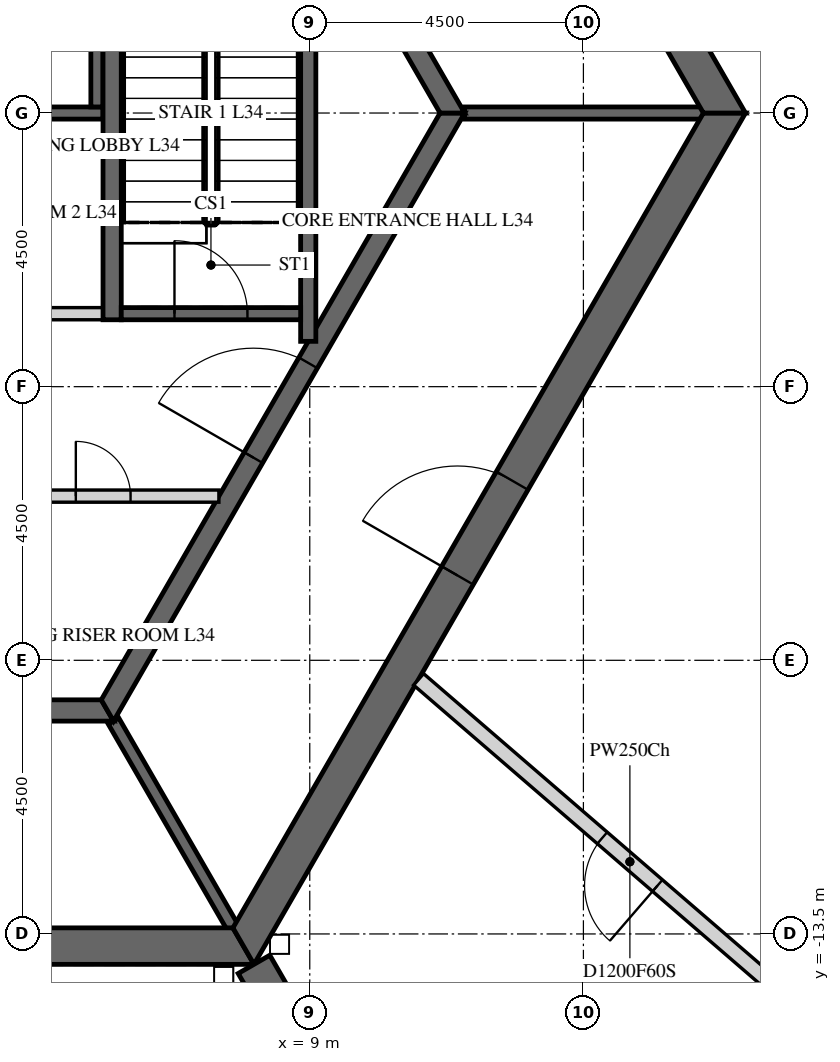
"""IFC4 building model, lengths in metres.
Left out: names, types, materials, properties, quantities, classifications, styles, units other than length and angle.
Written with IfcOpenShell. Run it as: python <this file> out.ifc"""

import sys

from ifc_helpers import new_model, si_unit, direction, frame, frame_2d, origin, place, context, subcontext, project, spatial, polyline, rectangle, outline, extrude, element, fill, save


model = new_model("IFC4")
c1 = context("Model", 3, precision=1e-05, world=origin(), true_north=direction((0.0, 1.0)))
c2 = subcontext(c1, "Body", "Model", "MODEL_VIEW")
j1 = project(units=[si_unit("LENGTHUNIT", "METRE"), si_unit("PLANEANGLEUNIT", "RADIAN")], contexts=[c1])
p1 = place(None, origin())
s1 = spatial("IfcSite", under=j1, at=p1, CompositionType="ELEMENT")
p2 = place(p1, origin())
s2 = spatial("IfcBuilding", under=s1, at=p2, CompositionType="ELEMENT")
p3 = place(p2, frame((0.0, 0.0, 146.7)))
s3 = spatial("IfcBuildingStorey", under=s2, at=p3, CompositionType="ELEMENT", Elevation=146.7)
p4 = place(p3, frame((-7.91, -13.7, -0.3), z_axis=(0.0, 0.0, 1.0), x_axis=(1.0, 0.0, 0.0)))
e1 = element("IfcWall", 1, at=p4, inside=s3, PredefinedType="SHEAR", context=c2, shape_type="SweptSolid", body=[
    extrude(outline(polyline([(-0.173, -0.3), (15.993, -0.3), (15.646, 0.3), (0.173, 0.3), (-0.173, -0.3)])), origin(), (0.0, 0.0, 1.0), 5.8),
])
p5 = place(p4, frame((7.31, 0.0, 0.3)))
e2 = element("IfcOpeningElement", 2, at=p5, cuts=e1, PredefinedType="OPENING", context=c2, shape_type="SweptSolid", body=[
    extrude(rectangle(XDim=1.2, YDim=2.4, at=frame_2d((0.6, 1.2))), frame((0.0, 0.31, 0.0), z_axis=(0.0, -1.0, 0.0), x_axis=(1.0, 0.0, 0.0)), (0.0, 0.0, 1.0), 0.62),
])
p6 = place(p3, frame((7.91, -13.7, -0.3), z_axis=(0.0, 0.0, 1.0), x_axis=(0.499999880136, 0.866025472988, 0.0)))
e3 = element("IfcWall", 3, at=p6, inside=s3, PredefinedType="SHEAR", context=c2, shape_type="SweptSolid", body=[
    extrude(outline(polyline([(-0.173, -0.3), (15.993, -0.3), (15.646, 0.3), (0.173, 0.3), (-0.173, -0.3)])), origin(), (0.0, 0.0, 1.0), 5.8),
])
p7 = place(p6, frame((7.039, 0.0, 0.3)))
e4 = element("IfcOpeningElement", 4, at=p7, cuts=e3, PredefinedType="OPENING", context=c2, shape_type="SweptSolid", body=[
    extrude(rectangle(XDim=1.8, YDim=2.4, at=frame_2d((0.9, 1.2))), frame((0.0, 0.31, 0.0), z_axis=(0.0, -1.0, 0.0), x_axis=(1.0, 0.0, 0.0)), (0.0, 0.0, 1.0), 0.62),
])
p8 = place(p3, frame((15.819, 0.0, -0.3), z_axis=(0.0, 0.0, 1.0), x_axis=(-0.499999880136, 0.866025472988, 0.0)))
e5 = element("IfcWall", 5, at=p8, inside=s3, PredefinedType="SHEAR", context=c2, shape_type="SweptSolid", body=[
    extrude(outline(polyline([(-0.173, -0.3), (15.993, -0.3), (15.646, 0.3), (0.173, 0.3), (-0.173, -0.3)])), origin(), (0.0, 0.0, 1.0), 5.8),
])
p9 = place(p8, frame((6.981, 0.0, 0.3)))
e6 = element("IfcOpeningElement", 6, at=p9, cuts=e5, PredefinedType="OPENING", context=c2, shape_type="SweptSolid", body=[
    extrude(rectangle(XDim=1.8, YDim=2.4, at=frame_2d((0.9, 1.2))), frame((0.0, 0.31, 0.0), z_axis=(0.0, -1.0, 0.0), x_axis=(1.0, 0.0, 0.0)), (0.0, 0.0, 1.0), 0.62),
])
p10 = place(p3, frame((8.083, -14.0, -0.3), z_axis=(0.0, 0.0, 1.0), x_axis=(0.499997680643, -0.866026742862, 0.0)))
e7 = element("IfcWall", 7, at=p10, inside=s3, PredefinedType="SHEAR", context=c2, shape_type="SweptSolid", body=[
    extrude(rectangle(XDim=16.509, YDim=0.6, at=frame_2d((8.254, 0.0))), origin(), (0.0, 0.0, 1.0), 5.8),
])
p11 = place(p10, frame((7.354, 0.0, 0.3)))
e8 = element("IfcOpeningElement", 8, at=p11, cuts=e7, PredefinedType="OPENING", context=c2, shape_type="SweptSolid", body=[
    extrude(rectangle(XDim=1.8, YDim=2.4, at=frame_2d((0.9, 1.2))), frame((0.0, 0.31, 0.0), z_axis=(0.0, -1.0, 0.0), x_axis=(1.0, 0.0, 0.0)), (0.0, 0.0, 1.0), 0.62),
])
p12 = place(p3, frame((-5.673, -9.825, -0.3), z_axis=(0.0, 0.0, 1.0), x_axis=(1.0, 0.0, 0.0)))
e9 = element("IfcWall", 9, at=p12, inside=s3, PredefinedType="SHEAR", context=c2, shape_type="SweptSolid", body=[
    extrude(outline(polyline([(-0.101, -0.175), (11.446, -0.175), (11.244, 0.175), (0.101, 0.175), (-0.101, -0.175)])), origin(), (0.0, 0.0, 1.0), 5.8),
])
p13 = place(p3, frame((5.673, -9.825, -0.3), z_axis=(0.0, 0.0, 1.0), x_axis=(0.499995046907, 0.866028263435, 0.0)))
e10 = element("IfcWall", 10, at=p13, inside=s3, PredefinedType="SHEAR", context=c2, shape_type="SweptSolid", body=[
    extrude(outline(polyline([(-0.101, -0.175), (11.446, -0.175), (11.244, 0.175), (0.101, 0.175), (-0.101, -0.175)])), origin(), (0.0, 0.0, 1.0), 5.8),
])
p14 = place(p13, frame((4.801, 0.0, 0.3)))
e11 = element("IfcOpeningElement", 11, at=p14, cuts=e10, PredefinedType="OPENING", context=c2, shape_type="SweptSolid", body=[
    extrude(rectangle(XDim=1.8, YDim=2.4, at=frame_2d((0.9, 1.2))), frame((0.0, 0.185, 0.0), z_axis=(0.0, -1.0, 0.0), x_axis=(1.0, 0.0, 0.0)), (0.0, 0.0, 1.0), 0.37),
])
p15 = place(p3, frame((11.345, 0.0, -0.3), z_axis=(0.0, 0.0, 1.0), x_axis=(-0.499995046907, 0.866028263435, 0.0)))
e12 = element("IfcWall", 12, at=p15, inside=s3, PredefinedType="SHEAR", context=c2, shape_type="SweptSolid", body=[
    extrude(outline(polyline([(-0.101, -0.175), (11.446, -0.175), (11.244, 0.175), (0.101, 0.175), (-0.101, -0.175)])), origin(), (0.0, 0.0, 1.0), 5.8),
])
p16 = place(p15, frame((4.744, 0.0, 0.3)))
e13 = element("IfcOpeningElement", 13, at=p16, cuts=e12, PredefinedType="OPENING", context=c2, shape_type="SweptSolid", body=[
    extrude(rectangle(XDim=1.8, YDim=2.4, at=frame_2d((0.9, 1.2))), frame((0.0, 0.185, 0.0), z_axis=(0.0, -1.0, 0.0), x_axis=(1.0, 0.0, 0.0)), (0.0, 0.0, 1.0), 0.37),
])
p17 = place(p3, frame((-5.6, 0.0, -0.25), z_axis=(0.0, 0.0, 1.0), x_axis=(1.0, 0.0, 0.0)))
e14 = element("IfcWall", 14, at=p17, inside=s3, PredefinedType="SHEAR", context=c2, shape_type="SweptSolid", body=[
    extrude(rectangle(XDim=11.2, YDim=0.2, at=frame_2d((5.6, 0.0))), origin(), (0.0, 0.0, 1.0), 5.75),
])
p18 = place(p3, frame((5.5, 0.1, -0.25), z_axis=(0.0, 0.0, 1.0), x_axis=(0.0, 1.0, 0.0)))
e15 = element("IfcWall", 15, at=p18, inside=s3, PredefinedType="SHEAR", context=c2, shape_type="SweptSolid", body=[
    extrude(rectangle(XDim=3.1, YDim=0.2, at=frame_2d((1.55, 0.0))), origin(), (0.0, 0.0, 1.0), 5.75),
])
p19 = place(p3, frame((0.1, -3.3, 0.0), z_axis=(0.0, 0.0, 1.0), x_axis=(1.0, 0.0, 0.0)))
e16 = element("IfcWall", 16, at=p19, inside=s3, PredefinedType="PARTITIONING", context=c2, shape_type="SweptSolid", body=[
    extrude(rectangle(XDim=5.5, YDim=0.2, at=frame_2d((2.75, 0.0))), origin(), (0.0, 0.0, 1.0), 5.5),
])
p20 = place(p19, frame((2.3, 0.0, 0.0)))
e17 = element("IfcOpeningElement", 17, at=p20, cuts=e16, PredefinedType="OPENING", context=c2, shape_type="SweptSolid", body=[
    extrude(rectangle(XDim=0.9, YDim=2.1, at=frame_2d((0.45, 1.05))), frame((0.0, 0.11, 0.0), z_axis=(0.0, -1.0, 0.0), x_axis=(1.0, 0.0, 0.0)), (0.0, 0.0, 1.0), 0.22),
])
p21 = place(p3, frame((3.7, -6.3, 0.0), z_axis=(0.0, 0.0, 1.0), x_axis=(1.0, 0.0, 0.0)))
e18 = element("IfcWall", 18, at=p21, inside=s3, PredefinedType="PARTITIONING", context=c2, shape_type="SweptSolid", body=[
    extrude(rectangle(XDim=3.806, YDim=0.2, at=frame_2d((1.903, 0.0))), origin(), (0.0, 0.0, 1.0), 5.5),
])
p22 = place(p21, frame((1.453, 0.0, 0.0)))
e19 = element("IfcOpeningElement", 19, at=p22, cuts=e18, PredefinedType="OPENING", context=c2, shape_type="SweptSolid", body=[
    extrude(rectangle(XDim=0.9, YDim=2.1, at=frame_2d((0.45, 1.05))), frame((0.0, 0.11, 0.0), z_axis=(0.0, -1.0, 0.0), x_axis=(1.0, 0.0, 0.0)), (0.0, 0.0, 1.0), 0.22),
])
p23 = place(p3, frame((11.547, 0.0, -0.3), z_axis=(0.0, 0.0, 1.0), x_axis=(1.0, 0.0, 0.0)))
e20 = element("IfcWall", 20, at=p23, inside=s3, PredefinedType="SHEAR", context=c2, shape_type="SweptSolid", body=[
    extrude(rectangle(XDim=3.926, YDim=0.2, at=frame_2d((1.963, 0.0))), origin(), (0.0, 0.0, 1.0), 5.8),
])
p24 = place(p3, frame((5.773, -10.0, -0.3), z_axis=(0.0, 0.0, 1.0), x_axis=(0.500038251005, -0.86600331843, 0.0)))
e21 = element("IfcWall", 21, at=p24, inside=s3, PredefinedType="SHEAR", context=c2, shape_type="SweptSolid", body=[
    extrude(rectangle(XDim=3.926, YDim=0.2, at=frame_2d((1.963, 0.0))), origin(), (0.0, 0.0, 1.0), 5.8),
])
p25 = place(p3, frame((5.75, -3.4, -0.25), z_axis=(0.0, 0.0, 1.0), x_axis=(0.0, 1.0, 0.0)))
e22 = element("IfcWall", 22, at=p25, inside=s3, PredefinedType="SHEAR", context=c2, shape_type="SweptSolid", body=[
    extrude(rectangle(XDim=6.8, YDim=0.3, at=frame_2d((3.4, 0.0))), origin(), (0.0, 0.0, 1.0), 5.75),
])
p26 = place(p3, frame((8.975, -3.755, -0.25), z_axis=(0.0, 0.0, 1.0), x_axis=(0.0, 1.0, 0.0)))
e23 = element("IfcWall", 23, at=p26, inside=s3, PredefinedType="SHEAR", context=c2, shape_type="SweptSolid", body=[
    extrude(rectangle(XDim=7.51, YDim=0.25, at=frame_2d((3.755, 0.0))), origin(), (0.0, 0.0, 1.0), 5.75),
])
p27 = place(p3, frame((5.9, -3.3, -0.25), z_axis=(0.0, 0.0, 1.0), x_axis=(1.0, 0.0, 0.0)))
e24 = element("IfcWall", 24, at=p27, inside=s3, PredefinedType="SHEAR", context=c2, shape_type="SweptSolid", body=[
    extrude(rectangle(XDim=2.95, YDim=0.2, at=frame_2d((1.475, 0.0))), origin(), (0.0, 0.0, 1.0), 5.75),
])
p28 = place(p27, frame((0.875, 0.0, 0.25)))
e25 = element("IfcOpeningElement", 25, at=p28, cuts=e24, PredefinedType="OPENING", context=c2, shape_type="SweptSolid", body=[
    extrude(rectangle(XDim=1.2, YDim=2.4, at=frame_2d((0.6, 1.2))), frame((0.0, 0.11, 0.0), z_axis=(0.0, -1.0, 0.0), x_axis=(1.0, 0.0, 0.0)), (0.0, 0.0, 1.0), 0.22),
])
p29 = place(p3, frame((17.74, -15.313, 0.0), z_axis=(0.0, 0.0, 1.0), x_axis=(-0.756988584599, 0.653428100702, 0.0)))
e26 = element("IfcWall", 26, at=p29, inside=s3, PredefinedType="PARTITIONING", context=c2, shape_type="SweptSolid", body=[
    extrude(rectangle(XDim=9.182, YDim=0.25, at=frame_2d((4.591, 0.0))), origin(), (0.0, 0.0, 1.0), 4.573),
])
p30 = place(p29, frame((3.991, 0.0, 0.0)))
e27 = element("IfcOpeningElement", 27, at=p30, cuts=e26, PredefinedType="OPENING", context=c2, shape_type="SweptSolid", body=[
    extrude(rectangle(XDim=1.2, YDim=2.1, at=frame_2d((0.6, 1.05))), frame((0.0, 0.135, 0.0), z_axis=(0.0, -1.0, 0.0), x_axis=(1.0, 0.0, 0.0)), (0.0, 0.0, 1.0), 0.27),
])
p31 = place(p3, frame((26.523, 0.1, 0.0), z_axis=(0.0, 0.0, 1.0), x_axis=(-0.499985419657, 0.866033821586, 0.0)))
e28 = element("IfcWall", 28, at=p31, inside=s3, PredefinedType="PARTITIONING", context=c2, shape_type="SweptSolid", body=[
    extrude(rectangle(XDim=26.119, YDim=0.2, at=frame_2d((13.06, 0.0))), origin(), (0.0, 0.0, 1.0), 4.573),
])
p32 = place(p31, frame((12.459, 0.0, 0.0)))
e29 = element("IfcOpeningElement", 29, at=p32, cuts=e28, PredefinedType="OPENING", context=c2, shape_type="SweptSolid", body=[
    extrude(rectangle(XDim=1.2, YDim=2.1, at=frame_2d((0.6, 1.05))), frame((0.0, 0.11, 0.0), z_axis=(0.0, -1.0, 0.0), x_axis=(1.0, 0.0, 0.0)), (0.0, 0.0, 1.0), 0.22),
])
p33 = place(p7, origin())
e30 = element("IfcDoor", 30, at=p33, inside=s3, OperationType="DOUBLE_DOOR_SINGLE_SWING", PredefinedType="DOOR", context=c2, shape_type="SweptSolid", body=[
    extrude(rectangle(XDim=1.8, YDim=2.4, at=frame_2d((0.9, 1.2))), frame((0.0, 0.025, 0.0), z_axis=(0.0, -1.0, 0.0), x_axis=(1.0, 0.0, 0.0)), (0.0, 0.0, 1.0), 0.05),
])
fill(e4, e30)
p34 = place(p14, origin())
e31 = element("IfcDoor", 31, at=p34, inside=s3, OperationType="DOUBLE_DOOR_SINGLE_SWING", PredefinedType="DOOR", context=c2, shape_type="SweptSolid", body=[
    extrude(rectangle(XDim=1.8, YDim=2.4, at=frame_2d((0.9, 1.2))), frame((0.0, 0.025, 0.0), z_axis=(0.0, -1.0, 0.0), x_axis=(1.0, 0.0, 0.0)), (0.0, 0.0, 1.0), 0.05),
])
fill(e11, e31)
p35 = place(p22, origin())
e32 = element("IfcDoor", 32, at=p35, inside=s3, OperationType="SINGLE_SWING_LEFT", PredefinedType="DOOR", context=c2, shape_type="SweptSolid", body=[
    extrude(rectangle(XDim=0.9, YDim=2.1, at=frame_2d((0.45, 1.05))), frame((0.0, 0.025, 0.0), z_axis=(0.0, -1.0, 0.0), x_axis=(1.0, 0.0, 0.0)), (0.0, 0.0, 1.0), 0.05),
])
fill(e19, e32)
p36 = place(p28, origin())
e33 = element("IfcDoor", 33, at=p36, inside=s3, OperationType="SINGLE_SWING_LEFT", PredefinedType="DOOR", context=c2, shape_type="SweptSolid", body=[
    extrude(rectangle(XDim=1.2, YDim=2.4, at=frame_2d((0.6, 1.2))), frame((0.0, 0.025, 0.0), z_axis=(0.0, -1.0, 0.0), x_axis=(1.0, 0.0, 0.0)), (0.0, 0.0, 1.0), 0.05),
])
fill(e25, e33)
p37 = place(p30, origin())
e34 = element("IfcDoor", 34, at=p37, inside=s3, OperationType="SINGLE_SWING_LEFT", PredefinedType="DOOR", context=c2, shape_type="SweptSolid", body=[
    extrude(rectangle(XDim=1.2, YDim=2.1, at=frame_2d((0.6, 1.05))), frame((0.0, 0.025, 0.0), z_axis=(0.0, -1.0, 0.0), x_axis=(1.0, 0.0, 0.0)), (0.0, 0.0, 1.0), 0.05),
])
fill(e27, e34)
save(model, sys.argv[1])
